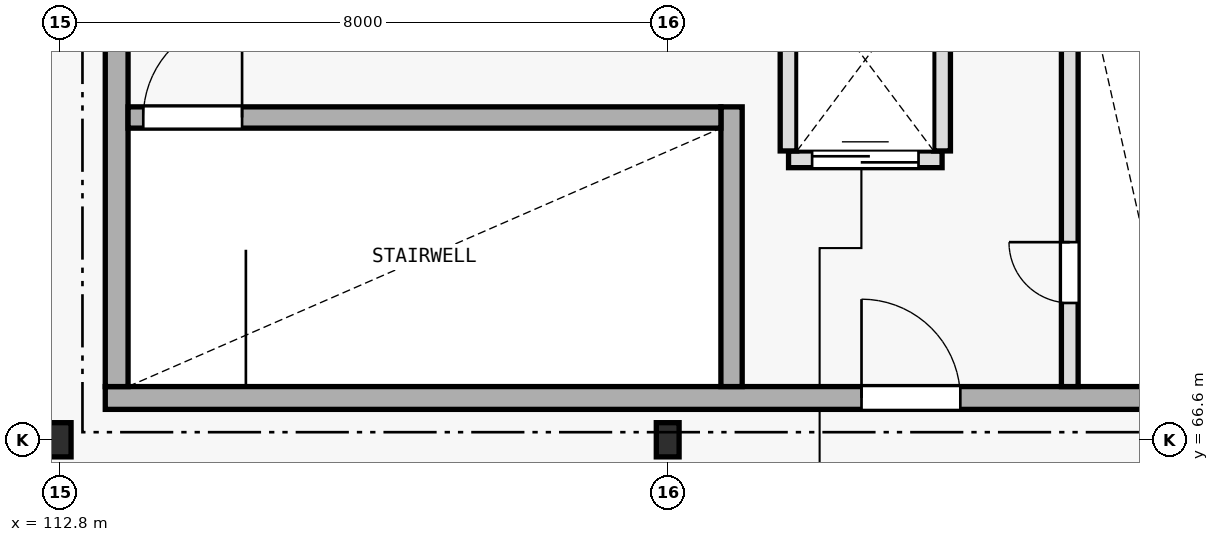
"""IFC4 building model, lengths in metres.
Left out: names, types, materials, properties, quantities, classifications, styles, units other than length and angle.
Written with IfcOpenShell. Run it as: python <this file> out.ifc"""

import sys

from ifc_helpers import new_model, si_unit, direction, frame, frame_2d, origin, origin_2d, place, context, subcontext, project, spatial, rectangle, i_section, extrude, element, fill, save


model = new_model("IFC4")
c1 = context("Model", 3, precision=1e-05, world=origin(), true_north=direction((0.0, 1.0)))
c2 = subcontext(c1, "Body", "Model", "MODEL_VIEW")
j1 = project(units=[si_unit("LENGTHUNIT", "METRE"), si_unit("PLANEANGLEUNIT", "RADIAN")], contexts=[c1])
p1 = place(None, origin())
s1 = spatial("IfcSite", under=j1, at=p1, CompositionType="ELEMENT")
p2 = place(p1, origin())
s2 = spatial("IfcBuilding", under=s1, at=p2, CompositionType="ELEMENT")
p3 = place(p2, frame((0.0, 0.0, 14.1)))
s3 = spatial("IfcBuildingStorey", under=s2, at=p3, CompositionType="ELEMENT", Elevation=14.1)
p4 = place(p3, frame((113.4, 67.15, 0.0), z_axis=(0.0, 0.0, 1.0), x_axis=(1.0, 0.0, 0.0)))
e1 = element("IfcWall", 1, at=p4, inside=s3, PredefinedType="SHEAR", context=c2, shape_type="SweptSolid", body=[
    extrude(rectangle(XDim=14.4, YDim=0.3, at=frame_2d((7.2, 0.0))), origin(), (0.0, 0.0, 1.0), 3.995),
])
p5 = place(p4, frame((9.95, 0.0, 0.0)))
e2 = element("IfcOpeningElement", 2, at=p5, cuts=e1, PredefinedType="OPENING", context=c2, shape_type="SweptSolid", body=[
    extrude(rectangle(XDim=1.3, YDim=2.2, at=frame_2d((0.65, 1.1))), frame((0.0, 0.16, 0.0), z_axis=(0.0, -1.0, 0.0), x_axis=(1.0, 0.0, 0.0)), (0.0, 0.0, 1.0), 0.32),
])
p6 = place(p3, frame((113.55, 67.3, 0.0), z_axis=(0.0, 0.0, 1.0), x_axis=(0.0, 1.0, 0.0)))
e3 = element("IfcWall", 3, at=p6, inside=s3, PredefinedType="SHEAR", context=c2, shape_type="SweptSolid", body=[
    extrude(rectangle(XDim=5.8, YDim=0.3, at=frame_2d((2.9, 0.0))), origin(), (0.0, 0.0, 1.0), 3.995),
])
p7 = place(p3, frame((121.64, 67.3, 0.0), z_axis=(0.0, 0.0, 1.0), x_axis=(0.0, 1.0, 0.0)))
e4 = element("IfcWall", 4, at=p7, inside=s3, PredefinedType="SHEAR", context=c2, shape_type="SweptSolid", body=[
    extrude(rectangle(XDim=3.68, YDim=0.28, at=frame_2d((1.84, 0.0))), origin(), (0.0, 0.0, 1.0), 3.995),
])
p8 = place(p3, frame((113.7, 70.84, 0.0), z_axis=(0.0, 0.0, 1.0), x_axis=(1.0, 0.0, 0.0)))
e5 = element("IfcWall", 5, at=p8, inside=s3, PredefinedType="SHEAR", context=c2, shape_type="SweptSolid", body=[
    extrude(rectangle(XDim=7.8, YDim=0.28, at=frame_2d((3.9, 0.0))), origin(), (0.0, 0.0, 1.0), 3.995),
])
p9 = place(p8, frame((0.2, 0.0, 0.0)))
e6 = element("IfcOpeningElement", 6, at=p9, cuts=e5, PredefinedType="OPENING", context=c2, shape_type="SweptSolid", body=[
    extrude(rectangle(XDim=1.3, YDim=2.2, at=frame_2d((0.65, 1.1))), frame((0.0, 0.15, 0.0), z_axis=(0.0, -1.0, 0.0), x_axis=(1.0, 0.0, 0.0)), (0.0, 0.0, 1.0), 0.3),
])
for number, where, z_axis, x_axis in (
    (7, (112.8, 66.6, 0.0), (0.0, 0.0, 1.0), (1.0, 0.0, 0.0)),
    (8, (120.8, 66.6, 0.0), (0.0, 0.0, 1.0), (1.0, 0.0, 0.0)),
):
    element("IfcColumn", number, at=place(p3, frame(where, z_axis=z_axis, x_axis=x_axis)), inside=s3, PredefinedType="COLUMN", context=c2, shape_type="SweptSolid", body=[
        extrude(i_section(OverallWidth=0.3, OverallDepth=0.45, WebThickness=0.014, FlangeThickness=0.026, FilletRadius=0.027, at=origin_2d()), origin(), (0.0, 0.0, 1.0), 4.0),
    ])
p10 = place(p3, frame((122.39, 70.29, 0.0), z_axis=(0.0, 0.0, 1.0), x_axis=(1.0, 0.0, 0.0)))
e9 = element("IfcWall", 9, at=p10, inside=s3, PredefinedType="PLUMBINGWALL", context=c2, shape_type="SweptSolid", body=[
    extrude(rectangle(XDim=2.02, YDim=0.22, at=frame_2d((1.01, 0.0))), origin(), (0.0, 0.0, 1.0), 3.72),
])
p11 = place(p10, frame((0.31, 0.0, 0.0)))
e10 = element("IfcOpeningElement", 10, at=p11, cuts=e9, PredefinedType="OPENING", context=c2, shape_type="SweptSolid", body=[
    extrude(rectangle(XDim=1.4, YDim=2.4, at=frame_2d((0.7, 1.2))), frame((0.0, 0.12, 0.0), z_axis=(0.0, -1.0, 0.0), x_axis=(1.0, 0.0, 0.0)), (0.0, 0.0, 1.0), 0.24),
])
for number, where, z_axis, x_axis in (
    (11, (122.39, 70.4, 0.0), (0.0, 0.0, 1.0), (0.0, 1.0, 0.0)),
    (12, (124.41, 70.4, 0.0), (0.0, 0.0, 1.0), (0.0, 1.0, 0.0)),
):
    element("IfcWall", number, at=place(p3, frame(where, z_axis=z_axis, x_axis=x_axis)), inside=s3, PredefinedType="PLUMBINGWALL", context=c2, shape_type="SweptSolid", body=[
        extrude(rectangle(XDim=2.4, YDim=0.22, at=frame_2d((1.2, 0.0))), origin(), (0.0, 0.0, 1.0), 3.72),
    ])
p12 = place(p3, frame((126.09, 67.3, 0.0), z_axis=(0.0, 0.0, 1.0), x_axis=(0.0, 1.0, 0.0)))
e13 = element("IfcWall", 13, at=p12, inside=s3, PredefinedType="PLUMBINGWALL", context=c2, shape_type="SweptSolid", body=[
    extrude(rectangle(XDim=5.8, YDim=0.22, at=frame_2d((2.9, 0.0))), origin(), (0.0, 0.0, 1.0), 3.72),
])
p13 = place(p12, frame((1.1, 0.0, 0.0)))
e14 = element("IfcOpeningElement", 14, at=p13, cuts=e13, PredefinedType="OPENING", context=c2, shape_type="SweptSolid", body=[
    extrude(rectangle(XDim=0.8, YDim=2.1, at=frame_2d((0.4, 1.05))), frame((0.0, 0.12, 0.0), z_axis=(0.0, -1.0, 0.0), x_axis=(1.0, 0.0, 0.0)), (0.0, 0.0, 1.0), 0.24),
])
p14 = place(p9, origin())
e15 = element("IfcDoor", 15, at=p14, inside=s3, OperationType="SINGLE_SWING_RIGHT", PredefinedType="DOOR", context=c2, shape_type="SweptSolid", body=[
    extrude(rectangle(XDim=1.3, YDim=2.2, at=frame_2d((0.65, 1.1))), frame((0.0, 0.025, 0.0), z_axis=(0.0, -1.0, 0.0), x_axis=(1.0, 0.0, 0.0)), (0.0, 0.0, 1.0), 0.05),
])
fill(e6, e15)
p15 = place(p11, origin())
e16 = element("IfcDoor", 16, at=p15, inside=s3, OperationType="DOUBLE_DOOR_SLIDING", PredefinedType="DOOR", context=c2, shape_type="SweptSolid", body=[
    extrude(rectangle(XDim=1.4, YDim=2.4, at=frame_2d((0.7, 1.2))), frame((0.0, 0.025, 0.0), z_axis=(0.0, -1.0, 0.0), x_axis=(1.0, 0.0, 0.0)), (0.0, 0.0, 1.0), 0.05),
])
fill(e10, e16)
p16 = place(p13, origin())
e17 = element("IfcDoor", 17, at=p16, inside=s3, OperationType="SINGLE_SWING_RIGHT", PredefinedType="DOOR", context=c2, shape_type="SweptSolid", body=[
    extrude(rectangle(XDim=0.8, YDim=2.1, at=frame_2d((0.4, 1.05))), frame((0.0, 0.025, 0.0), z_axis=(0.0, -1.0, 0.0), x_axis=(1.0, 0.0, 0.0)), (0.0, 0.0, 1.0), 0.05),
])
fill(e14, e17)
p17 = place(p5, origin())
e18 = element("IfcDoor", 18, at=p17, inside=s3, OperationType="SINGLE_SWING_LEFT", PredefinedType="DOOR", context=c2, shape_type="SweptSolid", body=[
    extrude(rectangle(XDim=1.3, YDim=2.2, at=frame_2d((0.65, 1.1))), frame((0.0, 0.025, 0.0), z_axis=(0.0, -1.0, 0.0), x_axis=(1.0, 0.0, 0.0)), (0.0, 0.0, 1.0), 0.05),
])
fill(e2, e18)
save(model, sys.argv[1])
